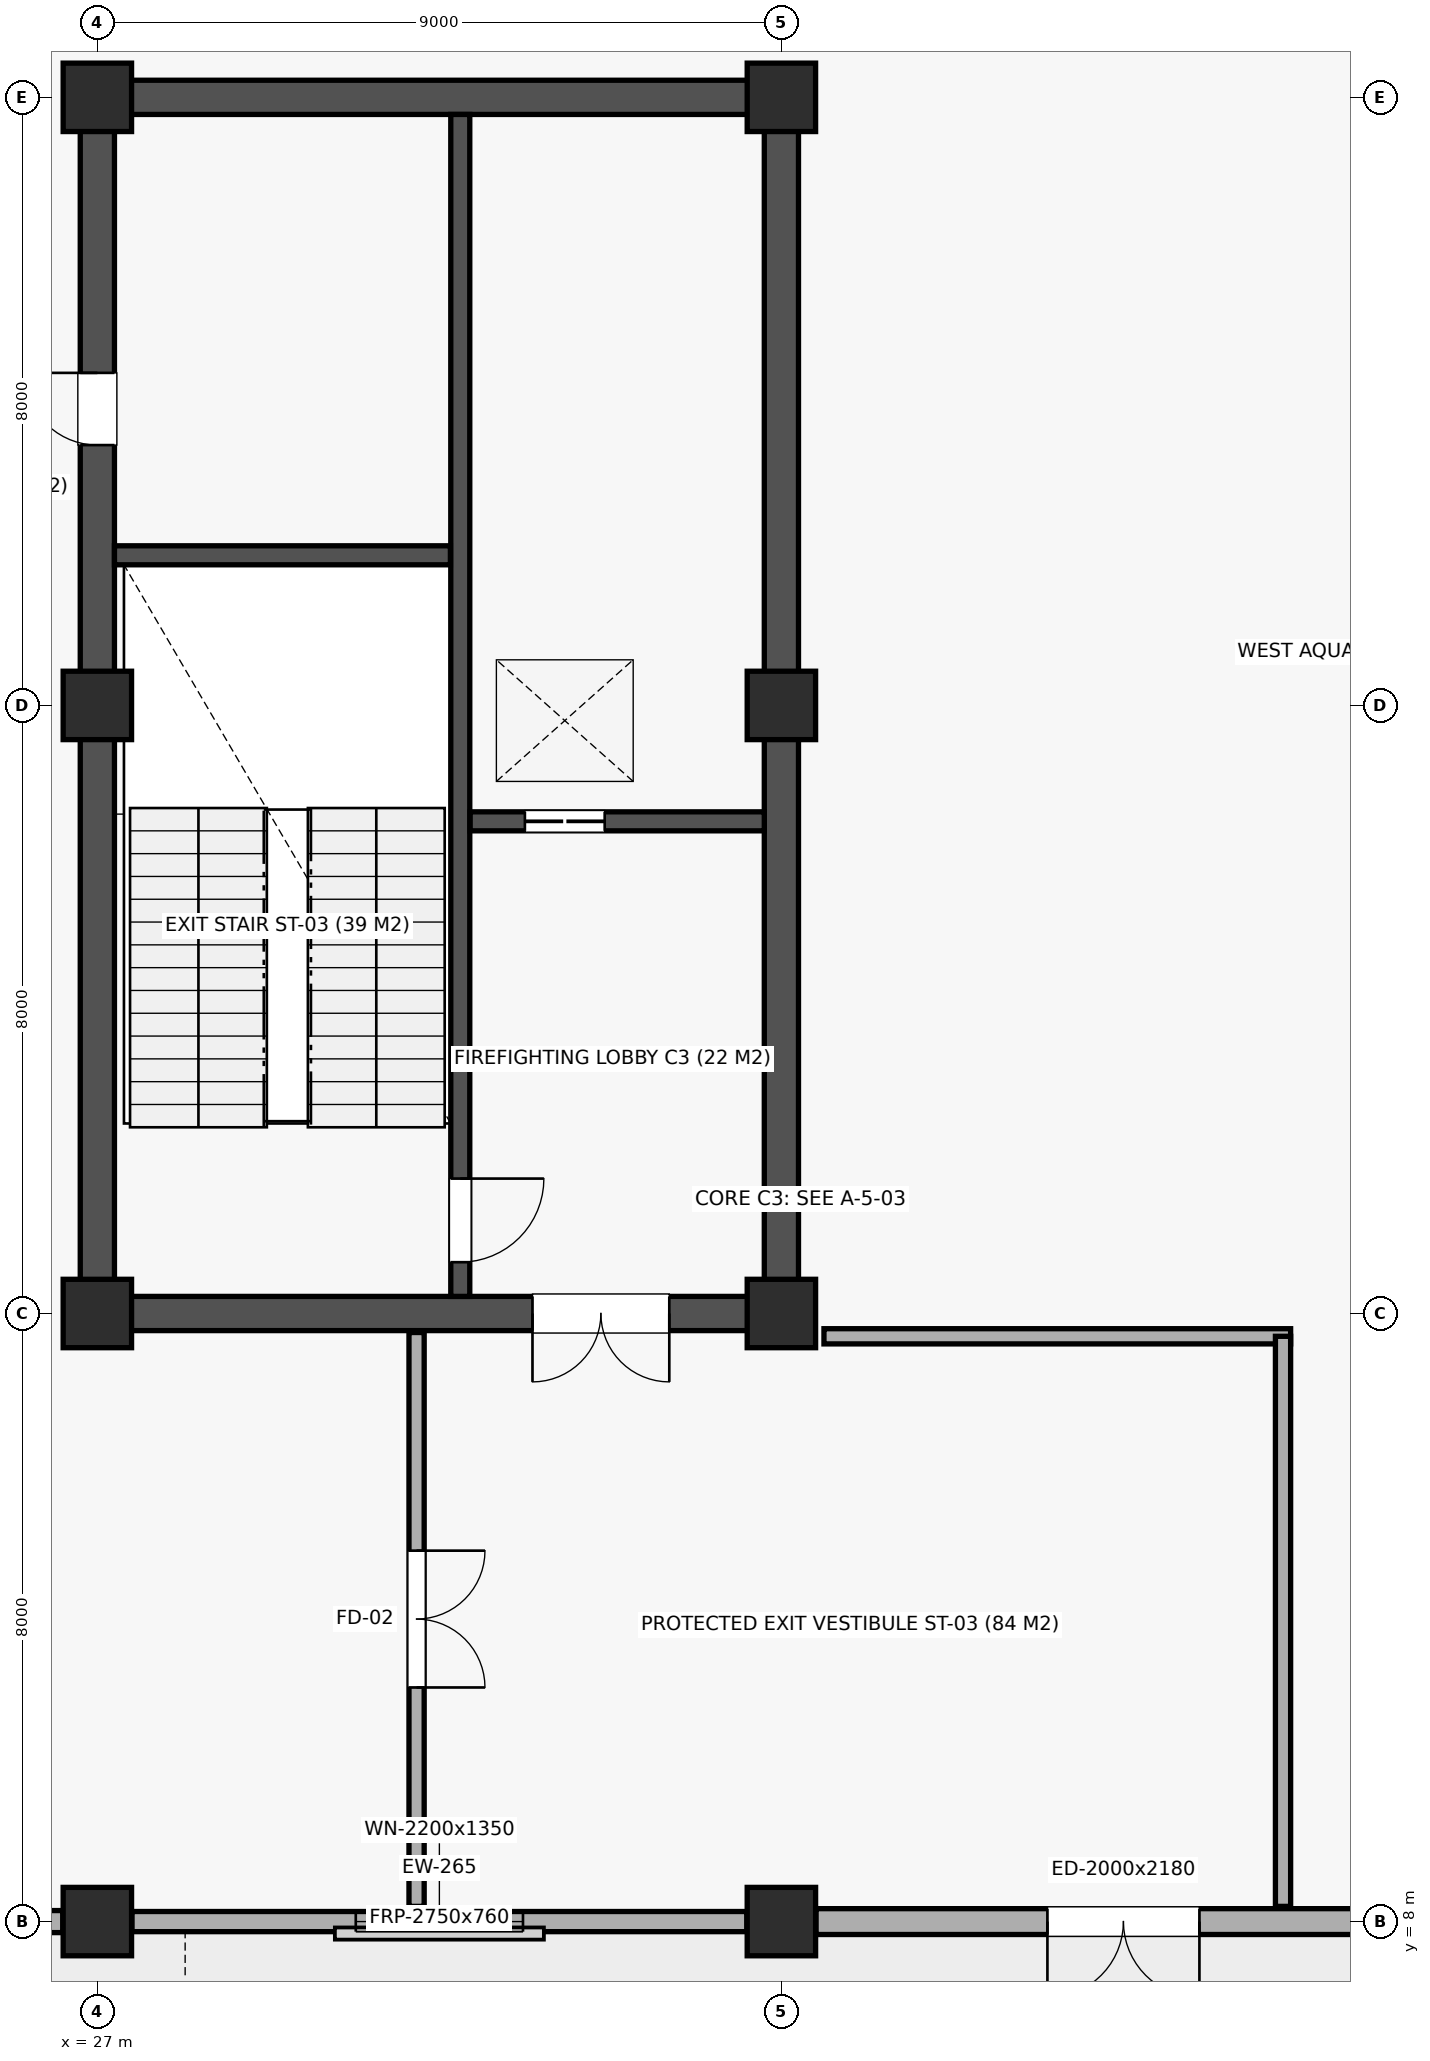
"""IFC4 building model, lengths in metres.
Left out: names, types, materials, properties, quantities, classifications, styles, units other than length and angle.
Written with IfcOpenShell. Run it as: python <this file> out.ifc"""

import sys

from ifc_helpers import new_model, si_unit, direction, frame, frame_2d, origin, origin_2d, place, context, subcontext, project, spatial, rectangle, extrude, element, fill, save


model = new_model("IFC4")
c1 = context("Model", 3, precision=1e-05, world=origin(), true_north=direction((0.0, 1.0)))
c2 = subcontext(c1, "Body", "Model", "MODEL_VIEW")
j1 = project(units=[si_unit("LENGTHUNIT", "METRE"), si_unit("PLANEANGLEUNIT", "RADIAN")], contexts=[c1])
p1 = place(None, origin())
s1 = spatial("IfcSite", under=j1, at=p1, CompositionType="ELEMENT")
p2 = place(p1, origin())
s2 = spatial("IfcBuilding", under=s1, at=p2, CompositionType="ELEMENT")
p3 = place(p2, origin())
s3 = spatial("IfcBuildingStorey", under=s2, at=p3, CompositionType="ELEMENT", Elevation=0.0)
for number, where, z_axis, x_axis in (
    (1, (27.0, 8.0, 0.0), (0.0, 0.0, 1.0), (1.0, 0.0, 0.0)),
    (2, (27.0, 16.0, 0.0), (0.0, 0.0, 1.0), (1.0, 0.0, 0.0)),
    (3, (27.0, 24.0, 0.0), (0.0, 0.0, 1.0), (1.0, 0.0, 0.0)),
    (4, (27.0, 32.0, 0.0), (0.0, 0.0, 1.0), (1.0, 0.0, 0.0)),
    (5, (36.0, 8.0, 0.0), (0.0, 0.0, 1.0), (1.0, 0.0, 0.0)),
    (6, (36.0, 16.0, 0.0), (0.0, 0.0, 1.0), (1.0, 0.0, 0.0)),
    (7, (36.0, 24.0, 0.0), (0.0, 0.0, 1.0), (1.0, 0.0, 0.0)),
    (8, (36.0, 32.0, 0.0), (0.0, 0.0, 1.0), (1.0, 0.0, 0.0)),
):
    element("IfcColumn", number, at=place(p3, frame(where, z_axis=z_axis, x_axis=x_axis)), inside=s3, PredefinedType="COLUMN", context=c2, shape_type="SweptSolid", body=[
        extrude(rectangle(XDim=0.9, YDim=0.9, at=origin_2d()), origin(), (0.0, 0.0, 1.0), 4.5),
    ])
p4 = place(p3, frame((27.225, 16.0, 0.0), z_axis=(0.0, 0.0, 1.0), x_axis=(1.0, 0.0, 0.0)))
e9 = element("IfcWall", 9, at=p4, inside=s3, PredefinedType="SHEAR", context=c2, shape_type="SweptSolid", body=[
    extrude(rectangle(XDim=8.55, YDim=0.45, at=frame_2d((4.275, 0.0))), origin(), (0.0, 0.0, 1.0), 3.45),
])
p5 = place(p4, frame((5.5, 0.0, 0.0)))
e10 = element("IfcOpeningElement", 10, at=p5, cuts=e9, PredefinedType="OPENING", context=c2, shape_type="SweptSolid", body=[
    extrude(rectangle(XDim=1.8, YDim=2.18, at=frame_2d((0.9, 1.09))), frame((0.0, 0.237, 0.0), z_axis=(0.0, -1.0, 0.0), x_axis=(1.0, 0.0, 0.0)), (0.0, 0.0, 1.0), 0.474),
])
p6 = place(p3, frame((27.225, 32.0, 0.0), z_axis=(0.0, 0.0, 1.0), x_axis=(1.0, 0.0, 0.0)))
e11 = element("IfcWall", 11, at=p6, inside=s3, PredefinedType="SHEAR", context=c2, shape_type="SweptSolid", body=[
    extrude(rectangle(XDim=8.55, YDim=0.45, at=frame_2d((4.275, 0.0))), origin(), (0.0, 0.0, 1.0), 3.45),
])
p7 = place(p3, frame((27.0, 16.225, 0.0), z_axis=(0.0, 0.0, 1.0), x_axis=(0.0, 1.0, 0.0)))
e12 = element("IfcWall", 12, at=p7, inside=s3, PredefinedType="SHEAR", context=c2, shape_type="SweptSolid", body=[
    extrude(rectangle(XDim=15.55, YDim=0.45, at=frame_2d((7.775, 0.0))), origin(), (0.0, 0.0, 1.0), 3.45),
])
p8 = place(p7, frame((11.2, 0.0, 0.0)))
e13 = element("IfcOpeningElement", 13, at=p8, cuts=e12, PredefinedType="OPENING", context=c2, shape_type="SweptSolid", body=[
    extrude(rectangle(XDim=0.95, YDim=2.1, at=frame_2d((0.475, 1.05))), frame((0.0, 0.237, 0.0), z_axis=(0.0, -1.0, 0.0), x_axis=(1.0, 0.0, 0.0)), (0.0, 0.0, 1.0), 0.474),
])
p9 = place(p3, frame((36.0, 16.225, 0.0), z_axis=(0.0, 0.0, 1.0), x_axis=(0.0, 1.0, 0.0)))
e14 = element("IfcWall", 14, at=p9, inside=s3, PredefinedType="SHEAR", context=c2, shape_type="SweptSolid", body=[
    extrude(rectangle(XDim=15.55, YDim=0.45, at=frame_2d((7.775, 0.0))), origin(), (0.0, 0.0, 1.0), 3.45),
])
p10 = place(p3, frame((31.775, 16.225, 0.0), z_axis=(0.0, 0.0, 1.0), x_axis=(0.0, 1.0, 0.0)))
e15 = element("IfcWall", 15, at=p10, inside=s3, PredefinedType="SOLIDWALL", context=c2, shape_type="SweptSolid", body=[
    extrude(rectangle(XDim=15.55, YDim=0.25, at=frame_2d((7.775, 0.0))), origin(), (0.0, 0.0, 1.0), 3.45),
])
p11 = place(p10, frame((0.45, 0.0, 0.0)))
e16 = element("IfcOpeningElement", 16, at=p11, cuts=e15, PredefinedType="OPENING", context=c2, shape_type="SweptSolid", body=[
    extrude(rectangle(XDim=1.1, YDim=2.15, at=frame_2d((0.55, 1.075))), frame((0.0, 0.137, 0.0), z_axis=(0.0, -1.0, 0.0), x_axis=(1.0, 0.0, 0.0)), (0.0, 0.0, 1.0), 0.274),
])
p12 = place(p3, frame((27.225, 25.975, 0.0), z_axis=(0.0, 0.0, 1.0), x_axis=(1.0, 0.0, 0.0)))
e17 = element("IfcWall", 17, at=p12, inside=s3, PredefinedType="SOLIDWALL", context=c2, shape_type="SweptSolid", body=[
    extrude(rectangle(XDim=4.42, YDim=0.25, at=frame_2d((2.21, 0.0))), origin(), (0.0, 0.0, 1.0), 3.45),
])
p13 = place(p3, frame((31.905, 22.475, 0.0), z_axis=(0.0, 0.0, 1.0), x_axis=(1.0, 0.0, 0.0)))
e18 = element("IfcWall", 18, at=p13, inside=s3, PredefinedType="SOLIDWALL", context=c2, shape_type="SweptSolid", body=[
    extrude(rectangle(XDim=3.87, YDim=0.25, at=frame_2d((1.935, 0.0))), origin(), (0.0, 0.0, 1.0), 3.45),
])
p14 = place(p13, frame((0.72, 0.0, 0.0)))
e19 = element("IfcOpeningElement", 19, at=p14, cuts=e18, PredefinedType="OPENING", context=c2, shape_type="SweptSolid", body=[
    extrude(rectangle(XDim=1.05, YDim=2.12, at=frame_2d((0.525, 1.06))), frame((0.0, 0.137, 0.0), z_axis=(0.0, -1.0, 0.0), x_axis=(1.0, 0.0, 0.0)), (0.0, 0.0, 1.0), 0.274),
])
p15 = place(p3, frame((18.455, 8.0, 0.0), z_axis=(0.0, 0.0, 1.0), x_axis=(1.0, 0.0, 0.0)))
e20 = element("IfcWall", 20, at=p15, inside=s3, PredefinedType="STANDARD", context=c2, shape_type="SweptSolid", body=[
    extrude(rectangle(XDim=8.09, YDim=0.29, at=frame_2d((4.045, 0.0))), origin(), (0.0, 0.0, 1.0), 2.49),
])
p16 = place(p15, frame((2.945, 0.0, 0.0)))
e21 = element("IfcOpeningElement", 21, at=p16, cuts=e20, PredefinedType="OPENING", context=c2, shape_type="SweptSolid", body=[
    extrude(rectangle(XDim=2.2, YDim=2.2, at=frame_2d((1.1, 1.1))), frame((0.0, 0.157, 0.0), z_axis=(0.0, -1.0, 0.0), x_axis=(1.0, 0.0, 0.0)), (0.0, 0.0, 1.0), 0.314),
])
p17 = place(p3, frame((27.455, 8.0, 0.0), z_axis=(0.0, 0.0, 1.0), x_axis=(1.0, 0.0, 0.0)))
e22 = element("IfcWall", 22, at=p17, inside=s3, PredefinedType="STANDARD", context=c2, shape_type="SweptSolid", body=[
    extrude(rectangle(XDim=8.09, YDim=0.265, at=frame_2d((4.045, 0.0))), origin(), (0.0, 0.0, 1.0), 2.49),
])
p18 = place(p17, frame((2.945, 0.0, 0.85)))
e23 = element("IfcOpeningElement", 23, at=p18, cuts=e22, PredefinedType="OPENING", context=c2, shape_type="SweptSolid", body=[
    extrude(rectangle(XDim=2.2, YDim=1.35, at=frame_2d((1.1, 0.675))), frame((0.0, 0.145, 0.0), z_axis=(0.0, -1.0, 0.0), x_axis=(1.0, 0.0, 0.0)), (0.0, 0.0, 1.0), 0.289),
])
p19 = place(p3, frame((36.455, 8.0, 0.0), z_axis=(0.0, 0.0, 1.0), x_axis=(1.0, 0.0, 0.0)))
e24 = element("IfcWall", 24, at=p19, inside=s3, PredefinedType="STANDARD", context=c2, shape_type="SweptSolid", body=[
    extrude(rectangle(XDim=8.09, YDim=0.34, at=frame_2d((4.045, 0.0))), origin(), (0.0, 0.0, 1.0), 2.49),
])
p20 = place(p19, frame((3.045, 0.0, 0.0)))
e25 = element("IfcOpeningElement", 25, at=p20, cuts=e24, PredefinedType="OPENING", context=c2, shape_type="SweptSolid", body=[
    extrude(rectangle(XDim=2.0, YDim=2.18, at=frame_2d((1.0, 1.09))), frame((0.0, 0.182, 0.0), z_axis=(0.0, -1.0, 0.0), x_axis=(1.0, 0.0, 0.0)), (0.0, 0.0, 1.0), 0.364),
])
p21 = place(p3, frame((31.2, 8.2, 0.0), z_axis=(0.0, 0.0, 1.0), x_axis=(0.0, 1.0, 0.0)))
e26 = element("IfcWall", 26, at=p21, inside=s3, PredefinedType="PARTITIONING", context=c2, shape_type="SweptSolid", body=[
    extrude(rectangle(XDim=7.55, YDim=0.2, at=frame_2d((3.775, 0.0))), origin(), (0.0, 0.0, 1.0), 3.3),
])
p22 = place(p21, frame((2.88, 0.0, 0.0)))
e27 = element("IfcOpeningElement", 27, at=p22, cuts=e26, PredefinedType="OPENING", context=c2, shape_type="SweptSolid", body=[
    extrude(rectangle(XDim=1.8, YDim=2.18, at=frame_2d((0.9, 1.09))), frame((0.0, 0.112, 0.0), z_axis=(0.0, -1.0, 0.0), x_axis=(1.0, 0.0, 0.0)), (0.0, 0.0, 1.0), 0.224),
])
p23 = place(p3, frame((36.56, 15.7, 0.0), z_axis=(0.0, 0.0, 1.0), x_axis=(1.0, 0.0, 0.0)))
e28 = element("IfcWall", 28, at=p23, inside=s3, PredefinedType="PARTITIONING", context=c2, shape_type="SweptSolid", body=[
    extrude(rectangle(XDim=6.14, YDim=0.2, at=frame_2d((3.07, 0.0))), origin(), (0.0, 0.0, 1.0), 2.6),
])
p24 = place(p3, frame((42.6, 8.2, 0.0), z_axis=(0.0, 0.0, 1.0), x_axis=(0.0, 1.0, 0.0)))
e29 = element("IfcWall", 29, at=p24, inside=s3, PredefinedType="PARTITIONING", context=c2, shape_type="SweptSolid", body=[
    extrude(rectangle(XDim=7.5, YDim=0.2, at=frame_2d((3.75, 0.0))), origin(), (0.0, 0.0, 1.0), 3.3),
])
p25 = place(p5, frame((1.8, 0.0, 0.0), z_axis=(0.0, 0.0, 1.0), x_axis=(-1.0, 0.0, 0.0)))
e30 = element("IfcDoor", 30, at=p25, inside=s3, OperationType="DOUBLE_DOOR_SINGLE_SWING", PredefinedType="DOOR", context=c2, shape_type="SweptSolid", body=[
    extrude(rectangle(XDim=1.8, YDim=2.18, at=frame_2d((0.9, 1.09))), frame((0.0, 0.025, 0.0), z_axis=(0.0, -1.0, 0.0), x_axis=(1.0, 0.0, 0.0)), (0.0, 0.0, 1.0), 0.05),
])
fill(e10, e30)
p26 = place(p11, frame((1.1, 0.0, 0.0), z_axis=(0.0, 0.0, 1.0), x_axis=(-1.0, 0.0, 0.0)))
e31 = element("IfcDoor", 31, at=p26, inside=s3, OperationType="SINGLE_SWING_LEFT", PredefinedType="DOOR", context=c2, shape_type="SweptSolid", body=[
    extrude(rectangle(XDim=1.1, YDim=2.15, at=frame_2d((0.55, 1.075))), frame((0.0, 0.025, 0.0), z_axis=(0.0, -1.0, 0.0), x_axis=(1.0, 0.0, 0.0)), (0.0, 0.0, 1.0), 0.05),
])
fill(e16, e31)
p27 = place(p8, origin())
e32 = element("IfcDoor", 32, at=p27, inside=s3, OperationType="SINGLE_SWING_RIGHT", PredefinedType="DOOR", context=c2, shape_type="SweptSolid", body=[
    extrude(rectangle(XDim=0.95, YDim=2.1, at=frame_2d((0.475, 1.05))), frame((0.0, 0.025, 0.0), z_axis=(0.0, -1.0, 0.0), x_axis=(1.0, 0.0, 0.0)), (0.0, 0.0, 1.0), 0.05),
])
fill(e13, e32)
p28 = place(p14, origin())
e33 = element("IfcDoor", 33, at=p28, inside=s3, OperationType="DOUBLE_DOOR_SLIDING", PredefinedType="DOOR", context=c2, shape_type="SweptSolid", body=[
    extrude(rectangle(XDim=1.05, YDim=2.12, at=frame_2d((0.525, 1.06))), frame((0.0, 0.025, 0.0), z_axis=(0.0, -1.0, 0.0), x_axis=(1.0, 0.0, 0.0)), (0.0, 0.0, 1.0), 0.05),
])
fill(e19, e33)
p29 = place(p18, origin())
e34 = element("IfcWindow", 34, at=p29, inside=s3, PartitioningType="SINGLE_PANEL", PredefinedType="WINDOW", context=c2, shape_type="SweptSolid", body=[
    extrude(rectangle(XDim=2.2, YDim=1.35, at=frame_2d((1.1, 0.675))), frame((0.0, 0.03, 0.0), z_axis=(0.0, -1.0, 0.0), x_axis=(1.0, 0.0, 0.0)), (0.0, 0.0, 1.0), 0.06),
])
fill(e23, e34)
p30 = place(p20, frame((2.0, 0.0, 0.0), z_axis=(0.0, 0.0, 1.0), x_axis=(-1.0, 0.0, 0.0)))
e35 = element("IfcDoor", 35, at=p30, inside=s3, OperationType="DOUBLE_DOOR_SINGLE_SWING", PredefinedType="DOOR", context=c2, shape_type="SweptSolid", body=[
    extrude(rectangle(XDim=2.0, YDim=2.18, at=frame_2d((1.0, 1.09))), frame((0.0, 0.025, 0.0), z_axis=(0.0, -1.0, 0.0), x_axis=(1.0, 0.0, 0.0)), (0.0, 0.0, 1.0), 0.05),
])
fill(e25, e35)
p31 = place(p22, frame((1.8, 0.0, 0.0), z_axis=(0.0, 0.0, 1.0), x_axis=(-1.0, 0.0, 0.0)))
e36 = element("IfcDoor", 36, at=p31, inside=s3, OperationType="DOUBLE_DOOR_SINGLE_SWING", PredefinedType="DOOR", context=c2, shape_type="SweptSolid", body=[
    extrude(rectangle(XDim=1.8, YDim=2.18, at=frame_2d((0.9, 1.09))), frame((0.0, 0.025, 0.0), z_axis=(0.0, -1.0, 0.0), x_axis=(1.0, 0.0, 0.0)), (0.0, 0.0, 1.0), 0.05),
])
fill(e27, e36)
save(model, sys.argv[1])
